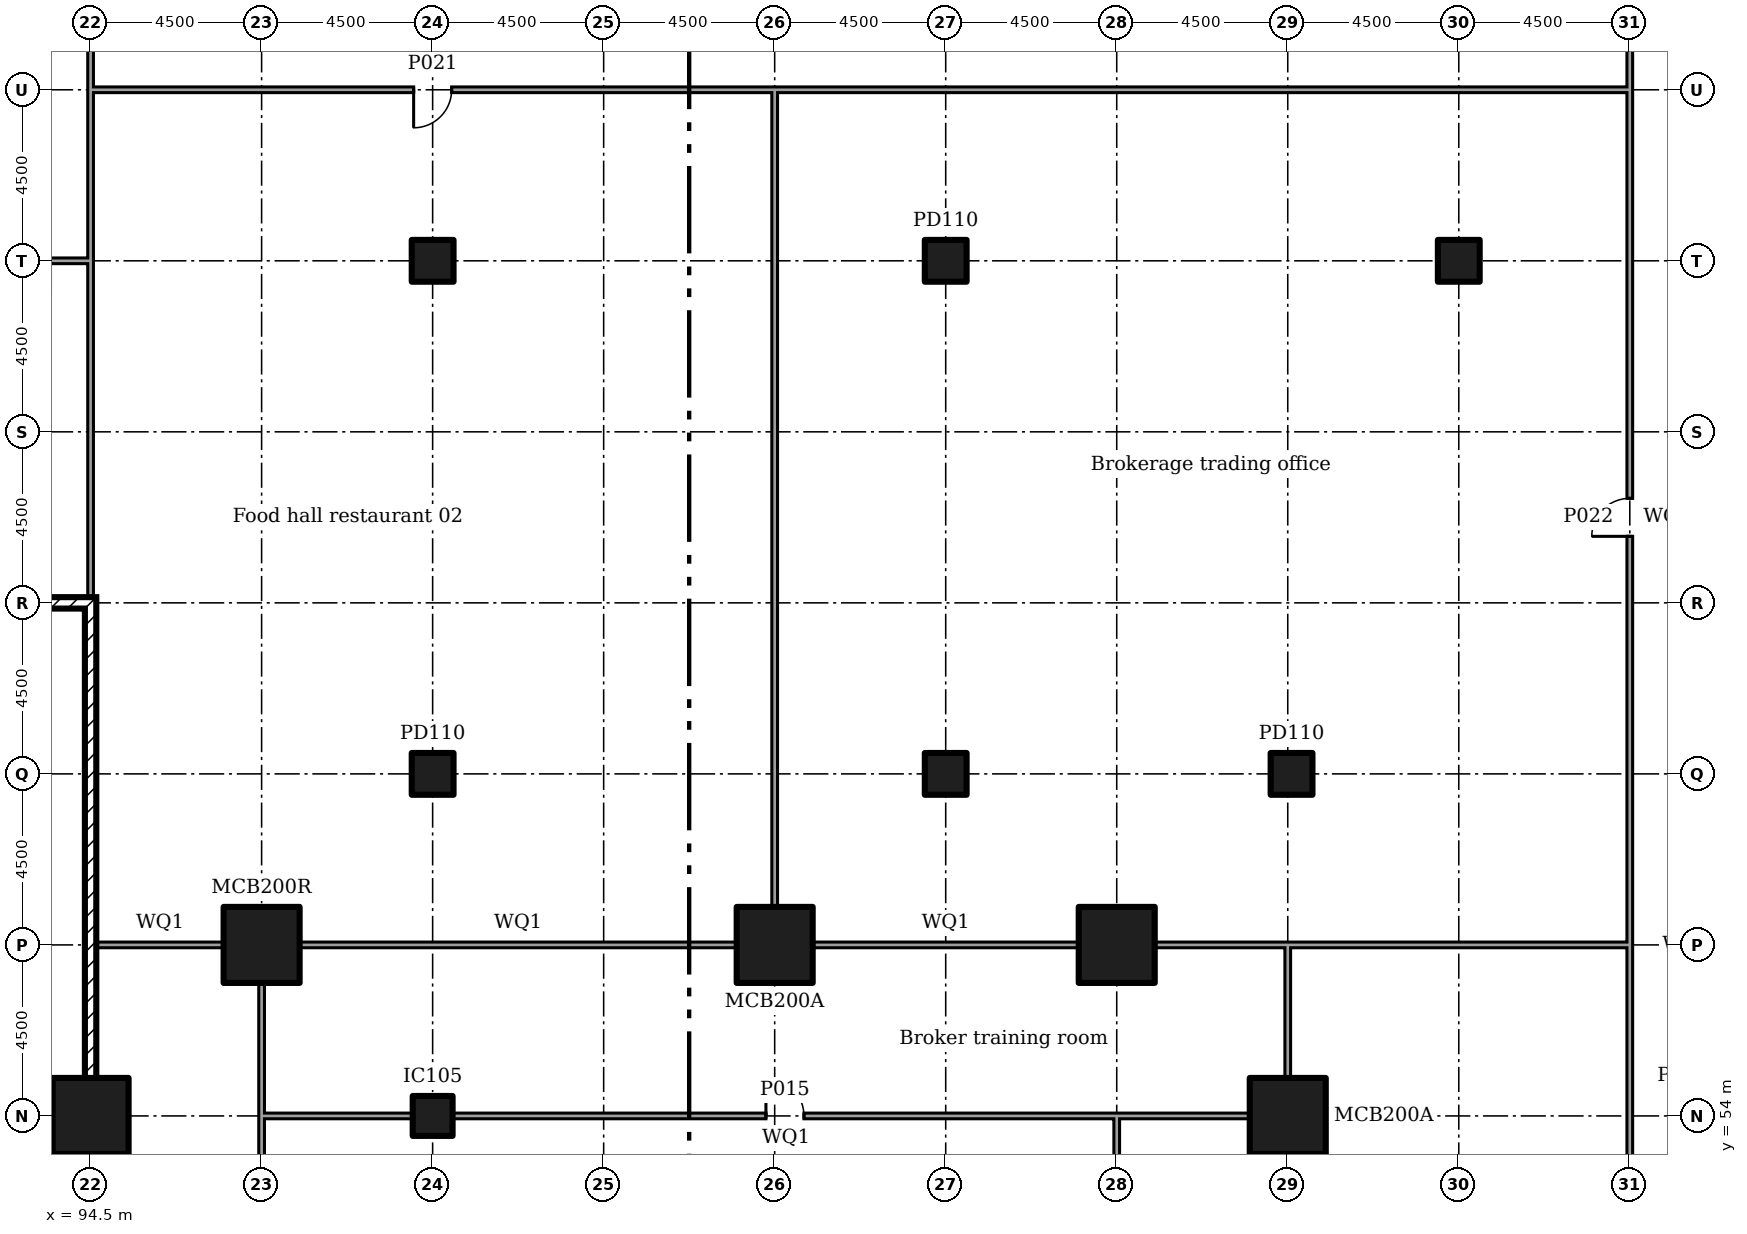
"""IFC4 building model, lengths in metres.
Left out: names, types, materials, properties, quantities, classifications, styles, units other than length and angle.
Written with IfcOpenShell. Run it as: python <this file> out.ifc"""

import sys

from ifc_helpers import new_model, si_unit, direction, frame, frame_2d, origin, origin_2d, place, context, subcontext, project, spatial, rectangle, extrude, element, fill, save


model = new_model("IFC4")
c1 = context("Model", 3, precision=1e-05, world=origin(), true_north=direction((0.0, 1.0)))
c2 = subcontext(c1, "Body", "Model", "MODEL_VIEW")
j1 = project(units=[si_unit("LENGTHUNIT", "METRE"), si_unit("PLANEANGLEUNIT", "RADIAN")], contexts=[c1])
p1 = place(None, origin())
s1 = spatial("IfcSite", under=j1, at=p1, CompositionType="ELEMENT")
p2 = place(p1, origin())
s2 = spatial("IfcBuilding", under=s1, at=p2, CompositionType="ELEMENT")
p3 = place(p2, frame((0.0, 0.0, 6.0)))
s3 = spatial("IfcBuildingStorey", under=s2, at=p3, CompositionType="ELEMENT", Elevation=6.0)
for number, where in (
    (1, (94.5, 54.0, 0.0)),
    (2, (99.0, 58.5, 0.0)),
    (3, (112.5, 58.5, 0.0)),
    (4, (121.5, 58.5, 0.0)),
    (5, (126.0, 54.0, 0.0)),
):
    element("IfcColumn", number, at=place(p3, frame(where)), inside=s3, PredefinedType="COLUMN", context=c2, shape_type="SweptSolid", body=[
        extrude(rectangle(XDim=2.0, YDim=2.0, at=origin_2d()), origin(), (0.0, 0.0, 1.0), 5.5),
    ])
p4 = place(p3, frame((103.5, 54.0, 0.0)))
e6 = element("IfcColumn", 6, at=p4, inside=s3, PredefinedType="COLUMN", context=c2, shape_type="SweptSolid", body=[
    extrude(rectangle(XDim=1.05, YDim=1.05, at=origin_2d()), origin(), (0.0, 0.0, 1.0), 5.5),
])
for number, where in (
    (7, (103.5, 63.0, 0.0)),
    (8, (103.5, 76.5, 0.0)),
    (9, (117.0, 63.0, 0.0)),
    (10, (117.0, 76.5, 0.0)),
    (11, (126.1, 63.0, 0.0)),
    (12, (130.5, 76.5, 0.0)),
):
    element("IfcColumn", number, at=place(p3, frame(where)), inside=s3, PredefinedType="COLUMN", context=c2, shape_type="SweptSolid", body=[
        extrude(rectangle(XDim=1.1, YDim=1.1, at=origin_2d()), origin(), (0.0, 0.0, 1.0), 5.5),
    ])
p5 = place(p3, frame((81.6, 67.5, 0.0)))
e13 = element("IfcWall", 13, at=p5, inside=s3, PredefinedType="SOLIDWALL", context=c2, shape_type="SweptSolid", body=[
    extrude(rectangle(XDim=13.05, YDim=0.3, at=frame_2d((6.525, 0.0))), origin(), (0.0, 0.0, 1.0), 5.5),
])
p6 = place(p5, frame((5.6, 0.0, 0.0)))
e14 = element("IfcOpeningElement", 14, at=p6, cuts=e13, PredefinedType="OPENING", context=c2, shape_type="SweptSolid", body=[
    extrude(rectangle(XDim=1.8, YDim=2.1, at=frame_2d((0.9, 1.05))), frame((0.0, 0.16, 0.0), z_axis=(0.0, -1.0, 0.0), x_axis=(1.0, 0.0, 0.0)), (0.0, 0.0, 1.0), 0.32),
])
p7 = place(p3, frame((94.5, 45.995, 0.0), z_axis=(0.0, 0.0, 1.0), x_axis=(0.0, 1.0, 0.0)))
e15 = element("IfcWall", 15, at=p7, inside=s3, PredefinedType="SOLIDWALL", context=c2, shape_type="SweptSolid", body=[
    extrude(rectangle(XDim=7.01, YDim=0.3, at=frame_2d((3.505, 0.0))), origin(), (0.0, 0.0, 1.0), 10.05),
])
p8 = place(p7, frame((2.6, 0.0, 0.0)))
e16 = element("IfcOpeningElement", 16, at=p8, cuts=e15, PredefinedType="OPENING", context=c2, shape_type="SweptSolid", body=[
    extrude(rectangle(XDim=1.8, YDim=2.1, at=frame_2d((0.9, 1.05))), frame((0.0, 0.16, 0.0), z_axis=(0.0, -1.0, 0.0), x_axis=(1.0, 0.0, 0.0)), (0.0, 0.0, 1.0), 0.32),
])
p9 = place(p3, frame((94.5, 54.995, 0.0), z_axis=(0.0, 0.0, 1.0), x_axis=(0.0, 1.0, 0.0)))
e17 = element("IfcWall", 17, at=p9, inside=s3, PredefinedType="SOLIDWALL", context=c2, shape_type="SweptSolid", body=[
    extrude(rectangle(XDim=3.58, YDim=0.3, at=frame_2d((1.79, 0.0))), origin(), (0.0, 0.0, 1.0), 10.05),
])
p10 = place(p3, frame((94.5, 58.425, 0.0), z_axis=(0.0, 0.0, 1.0), x_axis=(0.0, 1.0, 0.0)))
e18 = element("IfcWall", 18, at=p10, inside=s3, PredefinedType="SOLIDWALL", context=c2, shape_type="SweptSolid", body=[
    extrude(rectangle(XDim=8.925, YDim=0.3, at=frame_2d((4.462, 0.0))), origin(), (0.0, 0.0, 1.0), 10.05),
])
p11 = place(p3, frame((90.545, 76.5, 0.0)))
e19 = element("IfcWall", 19, at=p11, inside=s3, PredefinedType="PARTITIONING", context=c2, shape_type="SweptSolid", body=[
    extrude(rectangle(XDim=4.03, YDim=0.15, at=frame_2d((2.015, 0.0))), origin(), (0.0, 0.0, 1.0), 5.05),
])
p12 = place(p11, frame((1.1, 0.0, 0.0)))
e20 = element("IfcOpeningElement", 20, at=p12, cuts=e19, PredefinedType="OPENING", context=c2, shape_type="SweptSolid", body=[
    extrude(rectangle(XDim=1.8, YDim=2.1, at=frame_2d((0.9, 1.05))), frame((0.0, 0.085, 0.0), z_axis=(0.0, -1.0, 0.0), x_axis=(1.0, 0.0, 0.0)), (0.0, 0.0, 1.0), 0.17),
])
p13 = place(p3, frame((94.5, 67.5, 0.0), z_axis=(0.0, 0.0, 1.0), x_axis=(0.0, 1.0, 0.0)))
e21 = element("IfcWall", 21, at=p13, inside=s3, PredefinedType="PARTITIONING", context=c2, shape_type="SweptSolid", body=[
    extrude(rectangle(XDim=8.925, YDim=0.15, at=frame_2d((4.462, 0.0))), origin(), (0.0, 0.0, 1.0), 5.05),
])
p14 = place(p3, frame((94.5, 80.925, 0.0), z_axis=(0.0, 0.0, 1.0), x_axis=(0.0, 1.0, 0.0)))
e22 = element("IfcWall", 22, at=p14, inside=s3, PredefinedType="PARTITIONING", context=c2, shape_type="SweptSolid", body=[
    extrude(rectangle(XDim=8.775, YDim=0.15, at=frame_2d((4.387, 0.0))), origin(), (0.0, 0.0, 1.0), 5.05),
])
p15 = place(p14, frame((3.525, 0.0, 0.0)))
e23 = element("IfcOpeningElement", 23, at=p15, cuts=e22, PredefinedType="OPENING", context=c2, shape_type="SweptSolid", body=[
    extrude(rectangle(XDim=1.8, YDim=2.1, at=frame_2d((0.9, 1.05))), frame((0.0, 0.085, 0.0), z_axis=(0.0, -1.0, 0.0), x_axis=(1.0, 0.0, 0.0)), (0.0, 0.0, 1.0), 0.17),
])
p16 = place(p3, frame((94.5, 76.5, 0.0), z_axis=(0.0, 0.0, 1.0), x_axis=(0.0, 1.0, 0.0)))
e24 = element("IfcWall", 24, at=p16, inside=s3, PredefinedType="PARTITIONING", context=c2, shape_type="SweptSolid", body=[
    extrude(rectangle(XDim=4.5, YDim=0.15, at=frame_2d((2.25, 0.0))), origin(), (0.0, 0.0, 1.0), 5.05),
])
p17 = place(p3, frame((135.0, 80.925, 0.0), z_axis=(0.0, 0.0, 1.0), x_axis=(0.0, 1.0, 0.0)))
e25 = element("IfcWall", 25, at=p17, inside=s3, PredefinedType="PARTITIONING", context=c2, shape_type="SweptSolid", body=[
    extrude(rectangle(XDim=8.775, YDim=0.15, at=frame_2d((4.387, 0.0))), origin(), (0.0, 0.0, 1.0), 5.05),
])
p18 = place(p17, frame((3.525, 0.0, 0.0)))
e26 = element("IfcOpeningElement", 26, at=p18, cuts=e25, PredefinedType="OPENING", context=c2, shape_type="SweptSolid", body=[
    extrude(rectangle(XDim=1.8, YDim=2.1, at=frame_2d((0.9, 1.05))), frame((0.0, 0.085, 0.0), z_axis=(0.0, -1.0, 0.0), x_axis=(1.0, 0.0, 0.0)), (0.0, 0.0, 1.0), 0.17),
])
p19 = place(p3, frame((135.0, 40.5, 0.0), z_axis=(0.0, 0.0, 1.0), x_axis=(0.0, 1.0, 0.0)))
e27 = element("IfcWall", 27, at=p19, inside=s3, PredefinedType="PARTITIONING", context=c2, shape_type="SweptSolid", body=[
    extrude(rectangle(XDim=18.075, YDim=0.15, at=frame_2d((9.038, 0.0))), origin(), (0.0, 0.0, 1.0), 5.05),
])
p20 = place(p19, frame((7.3, 0.0, 0.0)))
e28 = element("IfcOpeningElement", 28, at=p20, cuts=e27, PredefinedType="OPENING", context=c2, shape_type="SweptSolid", body=[
    extrude(rectangle(XDim=1.0, YDim=2.1, at=frame_2d((0.5, 1.05))), frame((0.0, 0.085, 0.0), z_axis=(0.0, -1.0, 0.0), x_axis=(1.0, 0.0, 0.0)), (0.0, 0.0, 1.0), 0.17),
])
p21 = place(p3, frame((135.0, 58.5, 0.0), z_axis=(0.0, 0.0, 1.0), x_axis=(0.0, 1.0, 0.0)))
e29 = element("IfcWall", 29, at=p21, inside=s3, PredefinedType="PARTITIONING", context=c2, shape_type="SweptSolid", body=[
    extrude(rectangle(XDim=22.5, YDim=0.15, at=frame_2d((11.25, 0.0))), origin(), (0.0, 0.0, 1.0), 5.05),
])
p22 = place(p21, frame((10.75, 0.0, 0.0)))
e30 = element("IfcOpeningElement", 30, at=p22, cuts=e29, PredefinedType="OPENING", context=c2, shape_type="SweptSolid", body=[
    extrude(rectangle(XDim=1.0, YDim=2.1, at=frame_2d((0.5, 1.05))), frame((0.0, 0.085, 0.0), z_axis=(0.0, -1.0, 0.0), x_axis=(1.0, 0.0, 0.0)), (0.0, 0.0, 1.0), 0.17),
])
p23 = place(p3, frame((94.575, 81.0, 0.0)))
e31 = element("IfcWall", 31, at=p23, inside=s3, PredefinedType="PARTITIONING", context=c2, shape_type="SweptSolid", body=[
    extrude(rectangle(XDim=18.0, YDim=0.15, at=frame_2d((9.0, 0.0))), origin(), (0.0, 0.0, 1.0), 5.05),
])
p24 = place(p23, frame((8.425, 0.0, 0.0)))
e32 = element("IfcOpeningElement", 32, at=p24, cuts=e31, PredefinedType="OPENING", context=c2, shape_type="SweptSolid", body=[
    extrude(rectangle(XDim=1.0, YDim=2.1, at=frame_2d((0.5, 1.05))), frame((0.0, 0.085, 0.0), z_axis=(0.0, -1.0, 0.0), x_axis=(1.0, 0.0, 0.0)), (0.0, 0.0, 1.0), 0.17),
])
p25 = place(p3, frame((112.5, 81.0, 0.0)))
e33 = element("IfcWall", 33, at=p25, inside=s3, PredefinedType="PARTITIONING", context=c2, shape_type="SweptSolid", body=[
    extrude(rectangle(XDim=22.425, YDim=0.15, at=frame_2d((11.212, 0.0))), origin(), (0.0, 0.0, 1.0), 5.05),
])
p26 = place(p3, frame((99.0, 36.52, 0.0), z_axis=(0.0, 0.0, 1.0), x_axis=(0.0, 1.0, 0.0)))
e34 = element("IfcWall", 34, at=p26, inside=s3, PredefinedType="PARTITIONING", context=c2, shape_type="SweptSolid", body=[
    extrude(rectangle(XDim=17.555, YDim=0.15, at=frame_2d((8.777, 0.0))), origin(), (0.0, 0.0, 1.0), 5.05),
])
p27 = place(p26, frame((7.85, 0.0, 0.0)))
e35 = element("IfcOpeningElement", 35, at=p27, cuts=e34, PredefinedType="OPENING", context=c2, shape_type="SweptSolid", body=[
    extrude(rectangle(XDim=1.8, YDim=2.1, at=frame_2d((0.9, 1.05))), frame((0.0, 0.085, 0.0), z_axis=(0.0, -1.0, 0.0), x_axis=(1.0, 0.0, 0.0)), (0.0, 0.0, 1.0), 0.17),
])
p28 = place(p3, frame((99.0, 54.0, 0.0), z_axis=(0.0, 0.0, 1.0), x_axis=(0.0, 1.0, 0.0)))
e36 = element("IfcWall", 36, at=p28, inside=s3, PredefinedType="PARTITIONING", context=c2, shape_type="SweptSolid", body=[
    extrude(rectangle(XDim=3.505, YDim=0.15, at=frame_2d((1.752, 0.0))), origin(), (0.0, 0.0, 1.0), 5.05),
])
p29 = place(p3, frame((94.65, 58.5, 0.0)))
e37 = element("IfcWall", 37, at=p29, inside=s3, PredefinedType="PARTITIONING", context=c2, shape_type="SweptSolid", body=[
    extrude(rectangle(XDim=3.355, YDim=0.15, at=frame_2d((1.677, 0.0))), origin(), (0.0, 0.0, 1.0), 5.05),
])
p30 = place(p3, frame((99.075, 54.0, 0.0)))
e38 = element("IfcWall", 38, at=p30, inside=s3, PredefinedType="PARTITIONING", context=c2, shape_type="SweptSolid", body=[
    extrude(rectangle(XDim=3.905, YDim=0.15, at=frame_2d((1.953, 0.0))), origin(), (0.0, 0.0, 1.0), 5.05),
])
p31 = place(p3, frame((104.02, 54.0, 0.0)))
e39 = element("IfcWall", 39, at=p31, inside=s3, PredefinedType="PARTITIONING", context=c2, shape_type="SweptSolid", body=[
    extrude(rectangle(XDim=17.555, YDim=0.15, at=frame_2d((8.777, 0.0))), origin(), (0.0, 0.0, 1.0), 5.05),
])
p32 = place(p31, frame((8.25, 0.0, 0.0)))
e40 = element("IfcOpeningElement", 40, at=p32, cuts=e39, PredefinedType="OPENING", context=c2, shape_type="SweptSolid", body=[
    extrude(rectangle(XDim=1.0, YDim=2.1, at=frame_2d((0.5, 1.05))), frame((0.0, 0.085, 0.0), z_axis=(0.0, -1.0, 0.0), x_axis=(1.0, 0.0, 0.0)), (0.0, 0.0, 1.0), 0.17),
])
p33 = place(p3, frame((121.5, 50.02, 0.0), z_axis=(0.0, 0.0, 1.0), x_axis=(0.0, 1.0, 0.0)))
e41 = element("IfcWall", 41, at=p33, inside=s3, PredefinedType="PARTITIONING", context=c2, shape_type="SweptSolid", body=[
    extrude(rectangle(XDim=3.905, YDim=0.15, at=frame_2d((1.953, 0.0))), origin(), (0.0, 0.0, 1.0), 5.05),
])
p34 = place(p3, frame((121.5, 54.0, 0.0)))
e42 = element("IfcWall", 42, at=p34, inside=s3, PredefinedType="PARTITIONING", context=c2, shape_type="SweptSolid", body=[
    extrude(rectangle(XDim=3.505, YDim=0.15, at=frame_2d((1.752, 0.0))), origin(), (0.0, 0.0, 1.0), 5.05),
])
p35 = place(p3, frame((126.0, 54.995, 0.0), z_axis=(0.0, 0.0, 1.0), x_axis=(0.0, 1.0, 0.0)))
e43 = element("IfcWall", 43, at=p35, inside=s3, PredefinedType="PARTITIONING", context=c2, shape_type="SweptSolid", body=[
    extrude(rectangle(XDim=3.58, YDim=0.15, at=frame_2d((1.79, 0.0))), origin(), (0.0, 0.0, 1.0), 5.05),
])
p36 = place(p3, frame((99.995, 58.5, 0.0)))
e44 = element("IfcWall", 44, at=p36, inside=s3, PredefinedType="PARTITIONING", context=c2, shape_type="SweptSolid", body=[
    extrude(rectangle(XDim=11.51, YDim=0.15, at=frame_2d((5.755, 0.0))), origin(), (0.0, 0.0, 1.0), 5.05),
])
p37 = place(p3, frame((113.495, 58.5, 0.0)))
e45 = element("IfcWall", 45, at=p37, inside=s3, PredefinedType="PARTITIONING", context=c2, shape_type="SweptSolid", body=[
    extrude(rectangle(XDim=7.01, YDim=0.15, at=frame_2d((3.505, 0.0))), origin(), (0.0, 0.0, 1.0), 5.05),
])
p38 = place(p3, frame((122.495, 58.5, 0.0)))
e46 = element("IfcWall", 46, at=p38, inside=s3, PredefinedType="PARTITIONING", context=c2, shape_type="SweptSolid", body=[
    extrude(rectangle(XDim=3.43, YDim=0.15, at=frame_2d((1.715, 0.0))), origin(), (0.0, 0.0, 1.0), 5.05),
])
p39 = place(p3, frame((126.0, 45.995, 0.0), z_axis=(0.0, 0.0, 1.0), x_axis=(0.0, 1.0, 0.0)))
e47 = element("IfcWall", 47, at=p39, inside=s3, PredefinedType="PARTITIONING", context=c2, shape_type="SweptSolid", body=[
    extrude(rectangle(XDim=7.01, YDim=0.15, at=frame_2d((3.505, 0.0))), origin(), (0.0, 0.0, 1.0), 5.05),
])
p40 = place(p3, frame((126.0, 58.5, 0.0)))
e48 = element("IfcWall", 48, at=p40, inside=s3, PredefinedType="PARTITIONING", context=c2, shape_type="SweptSolid", body=[
    extrude(rectangle(XDim=8.925, YDim=0.15, at=frame_2d((4.462, 0.0))), origin(), (0.0, 0.0, 1.0), 5.05),
])
p41 = place(p3, frame((112.5, 59.495, 0.0), z_axis=(0.0, 0.0, 1.0), x_axis=(0.0, 1.0, 0.0)))
e49 = element("IfcWall", 49, at=p41, inside=s3, PredefinedType="PARTITIONING", context=c2, shape_type="SweptSolid", body=[
    extrude(rectangle(XDim=21.43, YDim=0.15, at=frame_2d((10.715, 0.0))), origin(), (0.0, 0.0, 1.0), 5.05),
])
p42 = place(p32, origin())
e50 = element("IfcDoor", 50, at=p42, inside=s3, OperationType="SINGLE_SWING_RIGHT", PredefinedType="DOOR", context=c2, shape_type="SweptSolid", body=[
    extrude(rectangle(XDim=1.0, YDim=2.1, at=frame_2d((0.5, 1.05))), frame((0.0, 0.025, 0.0), z_axis=(0.0, -1.0, 0.0), x_axis=(1.0, 0.0, 0.0)), (0.0, 0.0, 1.0), 0.05),
])
fill(e40, e50)
p43 = place(p24, frame((1.0, 0.0, 0.0), x_axis=(-1.0, 0.0, 0.0)))
e51 = element("IfcDoor", 51, at=p43, inside=s3, OperationType="SINGLE_SWING_LEFT", PredefinedType="DOOR", context=c2, shape_type="SweptSolid", body=[
    extrude(rectangle(XDim=1.0, YDim=2.1, at=frame_2d((0.5, 1.05))), frame((0.0, 0.025, 0.0), z_axis=(0.0, -1.0, 0.0), x_axis=(1.0, 0.0, 0.0)), (0.0, 0.0, 1.0), 0.05),
])
fill(e32, e51)
p44 = place(p22, origin())
e52 = element("IfcDoor", 52, at=p44, inside=s3, OperationType="SINGLE_SWING_RIGHT", PredefinedType="DOOR", context=c2, shape_type="SweptSolid", body=[
    extrude(rectangle(XDim=1.0, YDim=2.1, at=frame_2d((0.5, 1.05))), frame((0.0, 0.025, 0.0), z_axis=(0.0, -1.0, 0.0), x_axis=(1.0, 0.0, 0.0)), (0.0, 0.0, 1.0), 0.05),
])
fill(e30, e52)
save(model, sys.argv[1])
